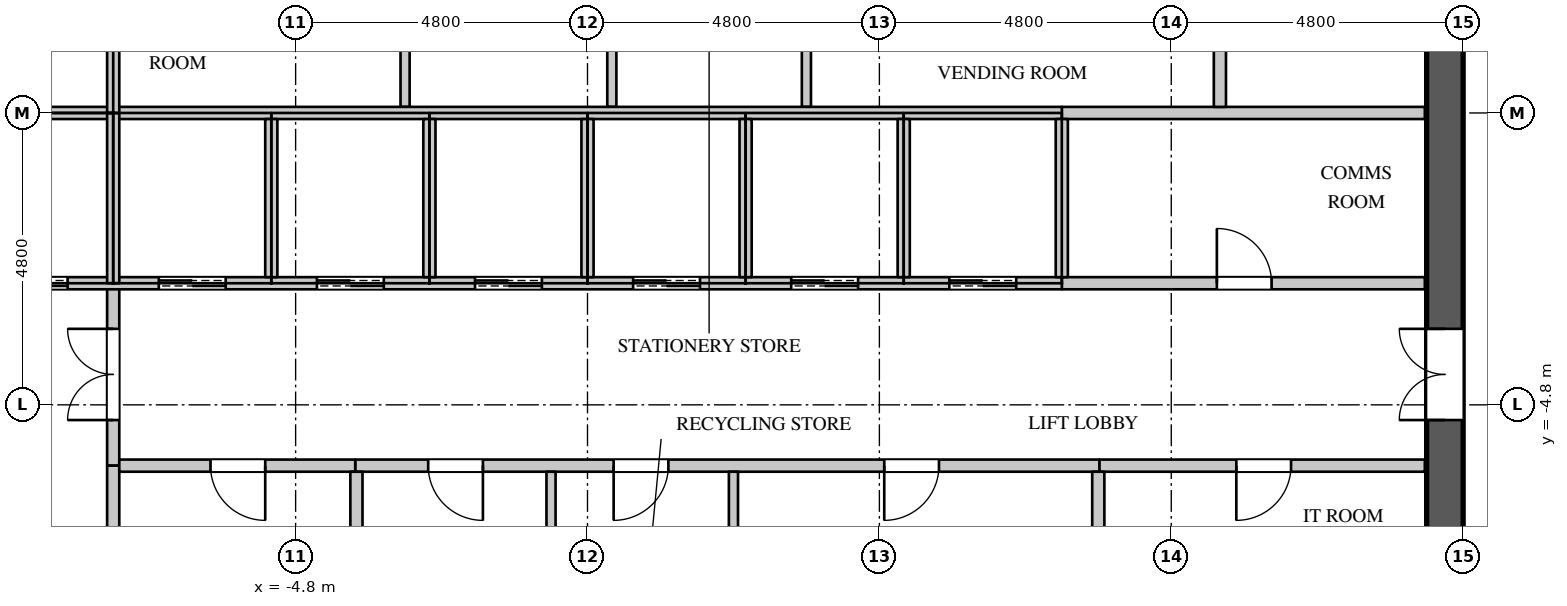
"""IFC4 building model, lengths in metres.
Left out: names, types, materials, properties, quantities, classifications, styles, units other than length and angle.
Written with IfcOpenShell. Run it as: python <this file> out.ifc"""

import sys

from ifc_helpers import new_model, si_unit, direction, frame, frame_2d, origin, place, context, subcontext, project, spatial, rectangle, extrude, element, fill, save


model = new_model("IFC4")
c1 = context("Model", 3, precision=1e-05, world=origin(), true_north=direction((0.0, 1.0)))
c2 = subcontext(c1, "Body", "Model", "MODEL_VIEW")
j1 = project(units=[si_unit("LENGTHUNIT", "METRE"), si_unit("PLANEANGLEUNIT", "RADIAN")], contexts=[c1])
p1 = place(None, origin())
s1 = spatial("IfcSite", under=j1, at=p1, CompositionType="ELEMENT")
p2 = place(p1, origin())
s2 = spatial("IfcBuilding", under=s1, at=p2, CompositionType="ELEMENT")
p3 = place(p2, frame((0.0, 0.0, 310.5)))
s3 = spatial("IfcBuildingStorey", under=s2, at=p3, CompositionType="ELEMENT", Elevation=310.5)
p4 = place(p3, frame((14.1, -11.4, 0.0), z_axis=(0.0, 0.0, 1.0), x_axis=(0.0, 1.0, 0.0)))
e1 = element("IfcWall", 1, at=p4, inside=s3, PredefinedType="SHEAR", context=c2, shape_type="SweptSolid", body=[
    extrude(rectangle(XDim=22.8, YDim=0.6, at=frame_2d((11.4, 0.0))), origin(), (0.0, 0.0, 1.0), 4.2),
])
p5 = place(p4, frame((20.45, 0.0, 0.0)))
e2 = element("IfcOpeningElement", 2, at=p5, cuts=e1, PredefinedType="OPENING", context=c2, shape_type="SweptSolid", body=[
    extrude(rectangle(XDim=1.1, YDim=2.2, at=frame_2d((0.55, 1.1))), frame((0.0, 0.31, 0.0), z_axis=(0.0, -1.0, 0.0), x_axis=(1.0, 0.0, 0.0)), (0.0, 0.0, 1.0), 0.62),
])
p6 = place(p4, frame((1.25, 0.0, 0.0)))
e3 = element("IfcOpeningElement", 3, at=p6, cuts=e1, PredefinedType="OPENING", context=c2, shape_type="SweptSolid", body=[
    extrude(rectangle(XDim=1.1, YDim=2.2, at=frame_2d((0.55, 1.1))), frame((0.0, 0.31, 0.0), z_axis=(0.0, -1.0, 0.0), x_axis=(1.0, 0.0, 0.0)), (0.0, 0.0, 1.0), 0.62),
])
p7 = place(p4, frame((14.95, 0.0, 0.0)))
e4 = element("IfcOpeningElement", 4, at=p7, cuts=e1, PredefinedType="OPENING", context=c2, shape_type="SweptSolid", body=[
    extrude(rectangle(XDim=1.5, YDim=2.4, at=frame_2d((0.75, 1.2))), frame((0.0, 0.31, 0.0), z_axis=(0.0, -1.0, 0.0), x_axis=(1.0, 0.0, 0.0)), (0.0, 0.0, 1.0), 0.62),
])
p8 = place(p4, frame((6.35, 0.0, 0.0)))
e5 = element("IfcOpeningElement", 5, at=p8, cuts=e1, PredefinedType="OPENING", context=c2, shape_type="SweptSolid", body=[
    extrude(rectangle(XDim=1.5, YDim=2.4, at=frame_2d((0.75, 1.2))), frame((0.0, 0.31, 0.0), z_axis=(0.0, -1.0, 0.0), x_axis=(1.0, 0.0, 0.0)), (0.0, 0.0, 1.0), 0.62),
])
p9 = place(p3, frame((-7.8, -5.8, 0.0), z_axis=(0.0, 0.0, 1.0), x_axis=(0.0, 1.0, 0.0)))
e6 = element("IfcWall", 6, at=p9, inside=s3, PredefinedType="PARTITIONING", context=c2, shape_type="SweptSolid", body=[
    extrude(rectangle(XDim=3.0, YDim=0.2, at=frame_2d((1.5, 0.0))), origin(), (0.0, 0.0, 1.0), 3.9),
])
p10 = place(p9, frame((0.75, 0.0, 0.0)))
e7 = element("IfcOpeningElement", 7, at=p10, cuts=e6, PredefinedType="OPENING", context=c2, shape_type="SweptSolid", body=[
    extrude(rectangle(XDim=1.5, YDim=2.4, at=frame_2d((0.75, 1.2))), frame((0.0, 0.11, 0.0), z_axis=(0.0, -1.0, 0.0), x_axis=(1.0, 0.0, 0.0)), (0.0, 0.0, 1.0), 0.22),
])
p11 = place(p3, frame((-3.82, -5.8, 0.0), z_axis=(0.0, 0.0, 1.0), x_axis=(1.0, 0.0, 0.0)))
e8 = element("IfcWall", 8, at=p11, inside=s3, PredefinedType="PARTITIONING", context=c2, shape_type="SweptSolid", body=[
    extrude(rectangle(XDim=12.24, YDim=0.2, at=frame_2d((6.12, 0.0))), origin(), (0.0, 0.0, 1.0), 3.9),
])
p12 = place(p11, frame((1.2, 0.0, 0.0)))
e9 = element("IfcOpeningElement", 9, at=p12, cuts=e8, PredefinedType="OPENING", context=c2, shape_type="SweptSolid", body=[
    extrude(rectangle(XDim=0.9, YDim=2.2, at=frame_2d((0.45, 1.1))), frame((0.0, 0.11, 0.0), z_axis=(0.0, -1.0, 0.0), x_axis=(1.0, 0.0, 0.0)), (0.0, 0.0, 1.0), 0.22),
])
p13 = place(p11, frame((4.25, 0.0, 0.0)))
e10 = element("IfcOpeningElement", 10, at=p13, cuts=e8, PredefinedType="OPENING", context=c2, shape_type="SweptSolid", body=[
    extrude(rectangle(XDim=0.9, YDim=2.2, at=frame_2d((0.45, 1.1))), frame((0.0, 0.11, 0.0), z_axis=(0.0, -1.0, 0.0), x_axis=(1.0, 0.0, 0.0)), (0.0, 0.0, 1.0), 0.22),
])
p14 = place(p11, frame((8.7, 0.0, 0.0)))
e11 = element("IfcOpeningElement", 11, at=p14, cuts=e8, PredefinedType="OPENING", context=c2, shape_type="SweptSolid", body=[
    extrude(rectangle(XDim=0.9, YDim=2.2, at=frame_2d((0.45, 1.1))), frame((0.0, 0.11, 0.0), z_axis=(0.0, -1.0, 0.0), x_axis=(1.0, 0.0, 0.0)), (0.0, 0.0, 1.0), 0.22),
])
p15 = place(p3, frame((-3.0, 0.1, 0.0), z_axis=(0.0, 0.0, 1.0), x_axis=(0.0, 1.0, 0.0)))
e12 = element("IfcWall", 12, at=p15, inside=s3, PredefinedType="PARTITIONING", context=c2, shape_type="SweptSolid", body=[
    extrude(rectangle(XDim=2.6, YDim=0.15, at=frame_2d((1.3, 0.0))), origin(), (0.0, 0.0, 1.0), 3.9),
])
p16 = place(p3, frame((-0.6, -11.37, 0.0), z_axis=(0.0, 0.0, 1.0), x_axis=(0.0, 1.0, 0.0)))
e13 = element("IfcWall", 13, at=p16, inside=s3, PredefinedType="PARTITIONING", context=c2, shape_type="SweptSolid", body=[
    extrude(rectangle(XDim=5.47, YDim=0.15, at=frame_2d((2.735, 0.0))), origin(), (0.0, 0.0, 1.0), 3.9),
])
p17 = place(p3, frame((0.4, 0.1, 0.0), z_axis=(0.0, 0.0, 1.0), x_axis=(0.0, 1.0, 0.0)))
e14 = element("IfcWall", 14, at=p17, inside=s3, PredefinedType="PARTITIONING", context=c2, shape_type="SweptSolid", body=[
    extrude(rectangle(XDim=2.6, YDim=0.15, at=frame_2d((1.3, 0.0))), origin(), (0.0, 0.0, 1.0), 3.9),
])
p18 = place(p3, frame((2.4, -11.37, 0.0), z_axis=(0.0, 0.0, 1.0), x_axis=(0.0, 1.0, 0.0)))
e15 = element("IfcWall", 15, at=p18, inside=s3, PredefinedType="PARTITIONING", context=c2, shape_type="SweptSolid", body=[
    extrude(rectangle(XDim=5.47, YDim=0.15, at=frame_2d((2.735, 0.0))), origin(), (0.0, 0.0, 1.0), 3.9),
])
p19 = place(p3, frame((3.6, 0.1, 0.0), z_axis=(0.0, 0.0, 1.0), x_axis=(0.0, 1.0, 0.0)))
e16 = element("IfcWall", 16, at=p19, inside=s3, PredefinedType="PARTITIONING", context=c2, shape_type="SweptSolid", body=[
    extrude(rectangle(XDim=2.6, YDim=0.15, at=frame_2d((1.3, 0.0))), origin(), (0.0, 0.0, 1.0), 3.9),
])
p20 = place(p3, frame((-7.8, -8.075, 0.0), z_axis=(0.0, 0.0, 1.0), x_axis=(0.0, 1.0, 0.0)))
e17 = element("IfcWall", 17, at=p20, inside=s3, PredefinedType="PARTITIONING", context=c2, shape_type="SweptSolid", body=[
    extrude(rectangle(XDim=2.275, YDim=0.2, at=frame_2d((1.137, 0.0))), origin(), (0.0, 0.0, 1.0), 3.9),
])
p21 = place(p3, frame((-7.7, -5.8, 0.0), z_axis=(0.0, 0.0, 1.0), x_axis=(1.0, 0.0, 0.0)))
e18 = element("IfcWall", 18, at=p21, inside=s3, PredefinedType="PARTITIONING", context=c2, shape_type="SweptSolid", body=[
    extrude(rectangle(XDim=3.88, YDim=0.2, at=frame_2d((1.94, 0.0))), origin(), (0.0, 0.0, 1.0), 3.9),
])
p22 = place(p21, frame((1.5, 0.0, 0.0)))
e19 = element("IfcOpeningElement", 19, at=p22, cuts=e18, PredefinedType="OPENING", context=c2, shape_type="SweptSolid", body=[
    extrude(rectangle(XDim=0.9, YDim=2.2, at=frame_2d((0.45, 1.1))), frame((0.0, 0.11, 0.0), z_axis=(0.0, -1.0, 0.0), x_axis=(1.0, 0.0, 0.0)), (0.0, 0.0, 1.0), 0.22),
])
p23 = place(p3, frame((-3.8, -11.37, 0.0), z_axis=(0.0, 0.0, 1.0), x_axis=(0.0, 1.0, 0.0)))
e20 = element("IfcWall", 20, at=p23, inside=s3, PredefinedType="PARTITIONING", context=c2, shape_type="SweptSolid", body=[
    extrude(rectangle(XDim=5.47, YDim=0.2, at=frame_2d((2.735, 0.0))), origin(), (0.0, 0.0, 1.0), 3.9),
])
p24 = place(p3, frame((7.8, -2.8, 0.0), z_axis=(0.0, 0.0, 1.0), x_axis=(1.0, 0.0, 0.0)))
e21 = element("IfcWall", 21, at=p24, inside=s3, PredefinedType="PARTITIONING", context=c2, shape_type="SweptSolid", body=[
    extrude(rectangle(XDim=5.97, YDim=0.2, at=frame_2d((2.985, 0.0))), origin(), (0.0, 0.0, 1.0), 3.9),
])
p25 = place(p24, frame((2.55, 0.0, 0.0)))
e22 = element("IfcOpeningElement", 22, at=p25, cuts=e21, PredefinedType="OPENING", context=c2, shape_type="SweptSolid", body=[
    extrude(rectangle(XDim=0.9, YDim=2.2, at=frame_2d((0.45, 1.1))), frame((0.0, 0.11, 0.0), z_axis=(0.0, -1.0, 0.0), x_axis=(1.0, 0.0, 0.0)), (0.0, 0.0, 1.0), 0.22),
])
p26 = place(p3, frame((7.8, 0.0, 0.0), z_axis=(0.0, 0.0, 1.0), x_axis=(1.0, 0.0, 0.0)))
e23 = element("IfcWall", 23, at=p26, inside=s3, PredefinedType="PARTITIONING", context=c2, shape_type="SweptSolid", body=[
    extrude(rectangle(XDim=5.97, YDim=0.2, at=frame_2d((2.985, 0.0))), origin(), (0.0, 0.0, 1.0), 3.9),
])
p27 = place(p3, frame((8.42, -5.8, 0.0), z_axis=(0.0, 0.0, 1.0), x_axis=(1.0, 0.0, 0.0)))
e24 = element("IfcWall", 24, at=p27, inside=s3, PredefinedType="PARTITIONING", context=c2, shape_type="SweptSolid", body=[
    extrude(rectangle(XDim=5.35, YDim=0.2, at=frame_2d((2.675, 0.0))), origin(), (0.0, 0.0, 1.0), 3.9),
])
p28 = place(p27, frame((2.25, 0.0, 0.0)))
e25 = element("IfcOpeningElement", 25, at=p28, cuts=e24, PredefinedType="OPENING", context=c2, shape_type="SweptSolid", body=[
    extrude(rectangle(XDim=0.9, YDim=2.2, at=frame_2d((0.45, 1.1))), frame((0.0, 0.11, 0.0), z_axis=(0.0, -1.0, 0.0), x_axis=(1.0, 0.0, 0.0)), (0.0, 0.0, 1.0), 0.22),
])
p29 = place(p3, frame((8.4, -8.075, 0.0), z_axis=(0.0, 0.0, 1.0), x_axis=(0.0, 1.0, 0.0)))
e26 = element("IfcWall", 26, at=p29, inside=s3, PredefinedType="PARTITIONING", context=c2, shape_type="SweptSolid", body=[
    extrude(rectangle(XDim=2.175, YDim=0.2, at=frame_2d((1.087, 0.0))), origin(), (0.0, 0.0, 1.0), 3.9),
])
p30 = place(p3, frame((10.4, 0.1, 0.0), z_axis=(0.0, 0.0, 1.0), x_axis=(0.0, 1.0, 0.0)))
e27 = element("IfcWall", 27, at=p30, inside=s3, PredefinedType="PARTITIONING", context=c2, shape_type="SweptSolid", body=[
    extrude(rectangle(XDim=2.6, YDim=0.2, at=frame_2d((1.3, 0.0))), origin(), (0.0, 0.0, 1.0), 3.9),
])
p31 = place(p3, frame((-13.77, 0.0, 0.0), z_axis=(0.0, 0.0, 1.0), x_axis=(1.0, 0.0, 0.0)))
e28 = element("IfcWall", 28, at=p31, inside=s3, PredefinedType="PARTITIONING", context=c2, shape_type="SweptSolid", body=[
    extrude(rectangle(XDim=21.57, YDim=0.2, at=frame_2d((10.785, 0.0))), origin(), (0.0, 0.0, 1.0), 3.9),
])
p32 = place(p3, frame((-10.4, -2.8, 0.0), z_axis=(0.0, 0.0, 1.0), x_axis=(1.0, 0.0, 0.0)))
e29 = element("IfcWall", 29, at=p32, inside=s3, PredefinedType="PARTITIONING", context=c2, shape_type="SweptSolid", body=[
    extrude(rectangle(XDim=18.2, YDim=0.2, at=frame_2d((9.1, 0.0))), origin(), (0.0, 0.0, 1.0), 3.9),
])
p33 = place(p32, frame((0.75, 0.0, 0.0)))
e30 = element("IfcOpeningElement", 30, at=p33, cuts=e29, PredefinedType="OPENING", context=c2, shape_type="SweptSolid", body=[
    extrude(rectangle(XDim=1.1, YDim=2.2, at=frame_2d((0.55, 1.1))), frame((0.0, 0.11, 0.0), z_axis=(0.0, -1.0, 0.0), x_axis=(1.0, 0.0, 0.0)), (0.0, 0.0, 1.0), 0.22),
])
p34 = place(p32, frame((3.35, 0.0, 0.0)))
e31 = element("IfcOpeningElement", 31, at=p34, cuts=e29, PredefinedType="OPENING", context=c2, shape_type="SweptSolid", body=[
    extrude(rectangle(XDim=1.1, YDim=2.2, at=frame_2d((0.55, 1.1))), frame((0.0, 0.11, 0.0), z_axis=(0.0, -1.0, 0.0), x_axis=(1.0, 0.0, 0.0)), (0.0, 0.0, 1.0), 0.22),
])
p35 = place(p32, frame((5.95, 0.0, 0.0)))
e32 = element("IfcOpeningElement", 32, at=p35, cuts=e29, PredefinedType="OPENING", context=c2, shape_type="SweptSolid", body=[
    extrude(rectangle(XDim=1.1, YDim=2.2, at=frame_2d((0.55, 1.1))), frame((0.0, 0.11, 0.0), z_axis=(0.0, -1.0, 0.0), x_axis=(1.0, 0.0, 0.0)), (0.0, 0.0, 1.0), 0.22),
])
p36 = place(p32, frame((8.55, 0.0, 0.0)))
e33 = element("IfcOpeningElement", 33, at=p36, cuts=e29, PredefinedType="OPENING", context=c2, shape_type="SweptSolid", body=[
    extrude(rectangle(XDim=1.1, YDim=2.2, at=frame_2d((0.55, 1.1))), frame((0.0, 0.11, 0.0), z_axis=(0.0, -1.0, 0.0), x_axis=(1.0, 0.0, 0.0)), (0.0, 0.0, 1.0), 0.22),
])
p37 = place(p32, frame((11.15, 0.0, 0.0)))
e34 = element("IfcOpeningElement", 34, at=p37, cuts=e29, PredefinedType="OPENING", context=c2, shape_type="SweptSolid", body=[
    extrude(rectangle(XDim=1.1, YDim=2.2, at=frame_2d((0.55, 1.1))), frame((0.0, 0.11, 0.0), z_axis=(0.0, -1.0, 0.0), x_axis=(1.0, 0.0, 0.0)), (0.0, 0.0, 1.0), 0.22),
])
p38 = place(p32, frame((13.75, 0.0, 0.0)))
e35 = element("IfcOpeningElement", 35, at=p38, cuts=e29, PredefinedType="OPENING", context=c2, shape_type="SweptSolid", body=[
    extrude(rectangle(XDim=1.1, YDim=2.2, at=frame_2d((0.55, 1.1))), frame((0.0, 0.11, 0.0), z_axis=(0.0, -1.0, 0.0), x_axis=(1.0, 0.0, 0.0)), (0.0, 0.0, 1.0), 0.22),
])
p39 = place(p32, frame((16.35, 0.0, 0.0)))
e36 = element("IfcOpeningElement", 36, at=p39, cuts=e29, PredefinedType="OPENING", context=c2, shape_type="SweptSolid", body=[
    extrude(rectangle(XDim=1.1, YDim=2.2, at=frame_2d((0.55, 1.1))), frame((0.0, 0.11, 0.0), z_axis=(0.0, -1.0, 0.0), x_axis=(1.0, 0.0, 0.0)), (0.0, 0.0, 1.0), 0.22),
])
for number, where, z_axis, x_axis in (
    (37, (-7.8, -2.8, 0.0), (0.0, 0.0, 1.0), (0.0, 1.0, 0.0)),
    (38, (-7.8, 0.0, 0.0), (0.0, 0.0, 1.0), (0.0, 1.0, 0.0)),
):
    element("IfcWall", number, at=place(p3, frame(where, z_axis=z_axis, x_axis=x_axis)), inside=s3, PredefinedType="PARTITIONING", context=c2, shape_type="SweptSolid", body=[
        extrude(rectangle(XDim=2.8, YDim=0.2, at=frame_2d((1.4, 0.0))), origin(), (0.0, 0.0, 1.0), 3.9),
    ])
for number, where, z_axis, x_axis in (
    (39, (-5.2, -2.7, 0.0), (0.0, 0.0, 1.0), (0.0, 1.0, 0.0)),
    (40, (-2.6, -2.7, 0.0), (0.0, 0.0, 1.0), (0.0, 1.0, 0.0)),
    (41, (0.0, -2.7, 0.0), (0.0, 0.0, 1.0), (0.0, 1.0, 0.0)),
    (42, (2.6, -2.7, 0.0), (0.0, 0.0, 1.0), (0.0, 1.0, 0.0)),
    (43, (5.2, -2.7, 0.0), (0.0, 0.0, 1.0), (0.0, 1.0, 0.0)),
    (44, (7.8, -2.7, 0.0), (0.0, 0.0, 1.0), (0.0, 1.0, 0.0)),
):
    element("IfcWall", number, at=place(p3, frame(where, z_axis=z_axis, x_axis=x_axis)), inside=s3, PredefinedType="PARTITIONING", context=c2, shape_type="SweptSolid", body=[
        extrude(rectangle(XDim=2.6, YDim=0.2, at=frame_2d((1.3, 0.0))), origin(), (0.0, 0.0, 1.0), 3.9),
    ])
p40 = place(p25, origin())
e45 = element("IfcDoor", 45, at=p40, inside=s3, OperationType="SINGLE_SWING_LEFT", PredefinedType="DOOR", context=c2, shape_type="SweptSolid", body=[
    extrude(rectangle(XDim=0.9, YDim=2.2, at=frame_2d((0.45, 1.1))), frame((0.0, 0.025, 0.0), z_axis=(0.0, -1.0, 0.0), x_axis=(1.0, 0.0, 0.0)), (0.0, 0.0, 1.0), 0.05),
])
fill(e22, e45)
p41 = place(p22, origin())
e46 = element("IfcDoor", 46, at=p41, inside=s3, OperationType="SINGLE_SWING_LEFT", PredefinedType="DOOR", context=c2, shape_type="SweptSolid", body=[
    extrude(rectangle(XDim=0.9, YDim=2.2, at=frame_2d((0.45, 1.1))), frame((0.0, 0.025, 0.0), z_axis=(0.0, -1.0, 0.0), x_axis=(1.0, 0.0, 0.0)), (0.0, 0.0, 1.0), 0.05),
])
fill(e19, e46)
p42 = place(p12, origin())
e47 = element("IfcDoor", 47, at=p42, inside=s3, OperationType="SINGLE_SWING_LEFT", PredefinedType="DOOR", context=c2, shape_type="SweptSolid", body=[
    extrude(rectangle(XDim=0.9, YDim=2.2, at=frame_2d((0.45, 1.1))), frame((0.0, 0.025, 0.0), z_axis=(0.0, -1.0, 0.0), x_axis=(1.0, 0.0, 0.0)), (0.0, 0.0, 1.0), 0.05),
])
fill(e9, e47)
p43 = place(p13, origin())
e48 = element("IfcDoor", 48, at=p43, inside=s3, OperationType="SINGLE_SWING_RIGHT", PredefinedType="DOOR", context=c2, shape_type="SweptSolid", body=[
    extrude(rectangle(XDim=0.9, YDim=2.2, at=frame_2d((0.45, 1.1))), frame((0.0, 0.025, 0.0), z_axis=(0.0, -1.0, 0.0), x_axis=(1.0, 0.0, 0.0)), (0.0, 0.0, 1.0), 0.05),
])
fill(e10, e48)
p44 = place(p14, origin())
e49 = element("IfcDoor", 49, at=p44, inside=s3, OperationType="SINGLE_SWING_RIGHT", PredefinedType="DOOR", context=c2, shape_type="SweptSolid", body=[
    extrude(rectangle(XDim=0.9, YDim=2.2, at=frame_2d((0.45, 1.1))), frame((0.0, 0.025, 0.0), z_axis=(0.0, -1.0, 0.0), x_axis=(1.0, 0.0, 0.0)), (0.0, 0.0, 1.0), 0.05),
])
fill(e11, e49)
p45 = place(p28, origin())
e50 = element("IfcDoor", 50, at=p45, inside=s3, OperationType="SINGLE_SWING_RIGHT", PredefinedType="DOOR", context=c2, shape_type="SweptSolid", body=[
    extrude(rectangle(XDim=0.9, YDim=2.2, at=frame_2d((0.45, 1.1))), frame((0.0, 0.025, 0.0), z_axis=(0.0, -1.0, 0.0), x_axis=(1.0, 0.0, 0.0)), (0.0, 0.0, 1.0), 0.05),
])
fill(e25, e50)
p46 = place(p33, origin())
e51 = element("IfcDoor", 51, at=p46, inside=s3, OperationType="DOUBLE_DOOR_SLIDING", PredefinedType="DOOR", context=c2, shape_type="SweptSolid", body=[
    extrude(rectangle(XDim=1.1, YDim=2.2, at=frame_2d((0.55, 1.1))), frame((0.0, 0.025, 0.0), z_axis=(0.0, -1.0, 0.0), x_axis=(1.0, 0.0, 0.0)), (0.0, 0.0, 1.0), 0.05),
])
fill(e30, e51)
p47 = place(p34, origin())
e52 = element("IfcDoor", 52, at=p47, inside=s3, OperationType="DOUBLE_DOOR_SLIDING", PredefinedType="DOOR", context=c2, shape_type="SweptSolid", body=[
    extrude(rectangle(XDim=1.1, YDim=2.2, at=frame_2d((0.55, 1.1))), frame((0.0, 0.025, 0.0), z_axis=(0.0, -1.0, 0.0), x_axis=(1.0, 0.0, 0.0)), (0.0, 0.0, 1.0), 0.05),
])
fill(e31, e52)
p48 = place(p35, origin())
e53 = element("IfcDoor", 53, at=p48, inside=s3, OperationType="DOUBLE_DOOR_SLIDING", PredefinedType="DOOR", context=c2, shape_type="SweptSolid", body=[
    extrude(rectangle(XDim=1.1, YDim=2.2, at=frame_2d((0.55, 1.1))), frame((0.0, 0.025, 0.0), z_axis=(0.0, -1.0, 0.0), x_axis=(1.0, 0.0, 0.0)), (0.0, 0.0, 1.0), 0.05),
])
fill(e32, e53)
p49 = place(p36, origin())
e54 = element("IfcDoor", 54, at=p49, inside=s3, OperationType="DOUBLE_DOOR_SLIDING", PredefinedType="DOOR", context=c2, shape_type="SweptSolid", body=[
    extrude(rectangle(XDim=1.1, YDim=2.2, at=frame_2d((0.55, 1.1))), frame((0.0, 0.025, 0.0), z_axis=(0.0, -1.0, 0.0), x_axis=(1.0, 0.0, 0.0)), (0.0, 0.0, 1.0), 0.05),
])
fill(e33, e54)
p50 = place(p37, origin())
e55 = element("IfcDoor", 55, at=p50, inside=s3, OperationType="DOUBLE_DOOR_SLIDING", PredefinedType="DOOR", context=c2, shape_type="SweptSolid", body=[
    extrude(rectangle(XDim=1.1, YDim=2.2, at=frame_2d((0.55, 1.1))), frame((0.0, 0.025, 0.0), z_axis=(0.0, -1.0, 0.0), x_axis=(1.0, 0.0, 0.0)), (0.0, 0.0, 1.0), 0.05),
])
fill(e34, e55)
p51 = place(p38, origin())
e56 = element("IfcDoor", 56, at=p51, inside=s3, OperationType="DOUBLE_DOOR_SLIDING", PredefinedType="DOOR", context=c2, shape_type="SweptSolid", body=[
    extrude(rectangle(XDim=1.1, YDim=2.2, at=frame_2d((0.55, 1.1))), frame((0.0, 0.025, 0.0), z_axis=(0.0, -1.0, 0.0), x_axis=(1.0, 0.0, 0.0)), (0.0, 0.0, 1.0), 0.05),
])
fill(e35, e56)
p52 = place(p39, origin())
e57 = element("IfcDoor", 57, at=p52, inside=s3, OperationType="DOUBLE_DOOR_SLIDING", PredefinedType="DOOR", context=c2, shape_type="SweptSolid", body=[
    extrude(rectangle(XDim=1.1, YDim=2.2, at=frame_2d((0.55, 1.1))), frame((0.0, 0.025, 0.0), z_axis=(0.0, -1.0, 0.0), x_axis=(1.0, 0.0, 0.0)), (0.0, 0.0, 1.0), 0.05),
])
fill(e36, e57)
p53 = place(p10, origin())
e58 = element("IfcDoor", 58, at=p53, inside=s3, OperationType="DOUBLE_DOOR_SINGLE_SWING", PredefinedType="DOOR", context=c2, shape_type="SweptSolid", body=[
    extrude(rectangle(XDim=1.5, YDim=2.4, at=frame_2d((0.75, 1.2))), frame((0.0, 0.025, 0.0), z_axis=(0.0, -1.0, 0.0), x_axis=(1.0, 0.0, 0.0)), (0.0, 0.0, 1.0), 0.05),
])
fill(e7, e58)
p54 = place(p8, origin())
e59 = element("IfcDoor", 59, at=p54, inside=s3, OperationType="DOUBLE_DOOR_SINGLE_SWING", PredefinedType="DOOR", context=c2, shape_type="SweptSolid", body=[
    extrude(rectangle(XDim=1.5, YDim=2.4, at=frame_2d((0.75, 1.2))), frame((0.0, 0.295, 0.0), z_axis=(0.0, -1.0, 0.0), x_axis=(1.0, 0.0, 0.0)), (0.0, 0.0, 1.0), 0.05),
])
fill(e5, e59)
save(model, sys.argv[1])
